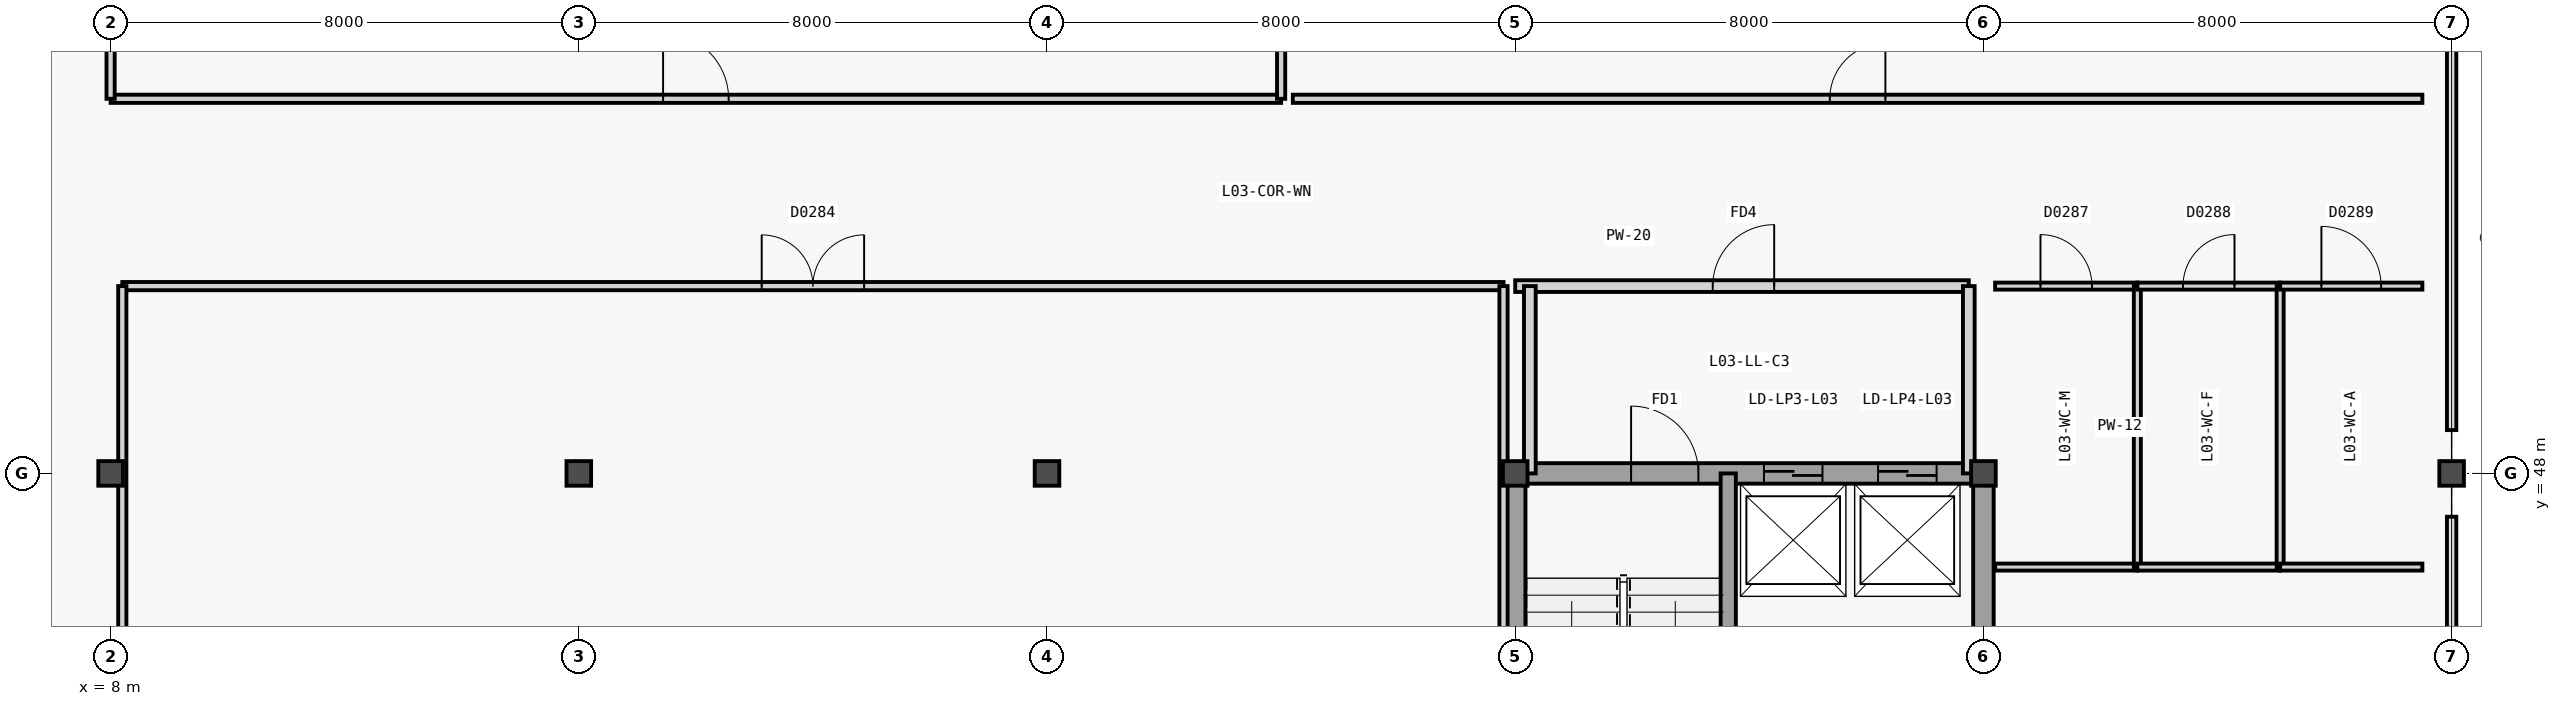
"""IFC4 building model, lengths in metres.
Left out: names, types, materials, properties, quantities, classifications, styles, units other than length and angle.
Written with IfcOpenShell. Run it as: python <this file> out.ifc"""

import sys

from ifc_helpers import new_model, si_unit, direction, frame, frame_2d, origin, origin_2d, place, context, subcontext, project, spatial, rectangle, extrude, element, fill, save


model = new_model("IFC4")
c1 = context("Model", 3, precision=1e-05, world=origin(), true_north=direction((0.0, 1.0)))
c2 = subcontext(c1, "Body", "Model", "MODEL_VIEW")
j1 = project(units=[si_unit("LENGTHUNIT", "METRE"), si_unit("PLANEANGLEUNIT", "RADIAN")], contexts=[c1])
p1 = place(None, origin())
s1 = spatial("IfcSite", under=j1, at=p1, CompositionType="ELEMENT")
p2 = place(p1, origin())
s2 = spatial("IfcBuilding", under=s1, at=p2, CompositionType="ELEMENT")
p3 = place(p2, frame((0.0, 0.0, 14.4)))
s3 = spatial("IfcBuildingStorey", under=s2, at=p3, CompositionType="ELEMENT", Elevation=14.4)
for number, where, z_axis, x_axis in (
    (1, (8.0, 48.0, 0.0), (0.0, 0.0, 1.0), (1.0, 0.0, 0.0)),
    (2, (16.0, 48.0, 0.0), (0.0, 0.0, 1.0), (1.0, 0.0, 0.0)),
    (3, (24.0, 48.0, 0.0), (0.0, 0.0, 1.0), (1.0, 0.0, 0.0)),
    (4, (32.0, 48.0, 0.0), (0.0, 0.0, 1.0), (1.0, 0.0, 0.0)),
    (5, (40.0, 48.0, 0.0), (0.0, 0.0, 1.0), (1.0, 0.0, 0.0)),
    (6, (48.0, 48.0, 0.0), (0.0, 0.0, 1.0), (1.0, 0.0, 0.0)),
):
    element("IfcColumn", number, at=place(p3, frame(where, z_axis=z_axis, x_axis=x_axis)), inside=s3, PredefinedType="COLUMN", context=c2, shape_type="SweptSolid", body=[
        extrude(rectangle(XDim=0.42, YDim=0.42, at=origin_2d()), origin(), (0.0, 0.0, 1.0), 3.6),
    ])
for number, where, z_axis, x_axis in (
    (7, (32.0, 40.0, 0.0), (0.0, 0.0, 1.0), (0.0, 1.0, 0.0)),
    (8, (40.0, 40.0, 0.0), (0.0, 0.0, 1.0), (0.0, 1.0, 0.0)),
):
    element("IfcWall", number, at=place(p3, frame(where, z_axis=z_axis, x_axis=x_axis)), inside=s3, PredefinedType="SHEAR", context=c2, shape_type="SweptSolid", body=[
        extrude(rectangle(XDim=8.0, YDim=0.35, at=frame_2d((4.0, 0.0))), origin(), (0.0, 0.0, 1.0), 3.6),
    ])
p4 = place(p3, frame((32.0, 48.0, 0.0), z_axis=(0.0, 0.0, 1.0), x_axis=(1.0, 0.0, 0.0)))
e9 = element("IfcWall", 9, at=p4, inside=s3, PredefinedType="SHEAR", context=c2, shape_type="SweptSolid", body=[
    extrude(rectangle(XDim=8.0, YDim=0.35, at=frame_2d((4.0, 0.0))), origin(), (0.0, 0.0, 1.0), 3.6),
])
p5 = place(p4, frame((1.98, 0.0, 0.0)))
e10 = element("IfcOpeningElement", 10, at=p5, cuts=e9, PredefinedType="OPENING", context=c2, shape_type="SweptSolid", body=[
    extrude(rectangle(XDim=1.15, YDim=2.2, at=frame_2d((0.575, 1.1))), frame((0.0, 0.185, 0.0), z_axis=(0.0, -1.0, 0.0), x_axis=(1.0, 0.0, 0.0)), (0.0, 0.0, 1.0), 0.37),
])
p6 = place(p4, frame((4.25, 0.0, 0.0)))
e11 = element("IfcOpeningElement", 11, at=p6, cuts=e9, PredefinedType="OPENING", context=c2, shape_type="SweptSolid", body=[
    extrude(rectangle(XDim=1.0, YDim=2.15, at=frame_2d((0.5, 1.075))), frame((0.0, 0.185, 0.0), z_axis=(0.0, -1.0, 0.0), x_axis=(1.0, 0.0, 0.0)), (0.0, 0.0, 1.0), 0.37),
])
p7 = place(p4, frame((6.2, 0.0, 0.0)))
e12 = element("IfcOpeningElement", 12, at=p7, cuts=e9, PredefinedType="OPENING", context=c2, shape_type="SweptSolid", body=[
    extrude(rectangle(XDim=1.0, YDim=2.15, at=frame_2d((0.5, 1.075))), frame((0.0, 0.185, 0.0), z_axis=(0.0, -1.0, 0.0), x_axis=(1.0, 0.0, 0.0)), (0.0, 0.0, 1.0), 0.37),
])
p8 = place(p3, frame((35.64, 40.0, 0.0), z_axis=(0.0, 0.0, 1.0), x_axis=(0.0, 1.0, 0.0)))
e13 = element("IfcWall", 13, at=p8, inside=s3, PredefinedType="SHEAR", context=c2, shape_type="SweptSolid", body=[
    extrude(rectangle(XDim=8.0, YDim=0.26, at=frame_2d((4.0, 0.0))), origin(), (0.0, 0.0, 1.0), 3.6),
])
p9 = place(p3, frame((32.0, 51.2, 0.0), z_axis=(0.0, 0.0, 1.0), x_axis=(1.0, 0.0, 0.0)))
e14 = element("IfcWall", 14, at=p9, inside=s3, PredefinedType="PARTITIONING", context=c2, shape_type="SweptSolid", body=[
    extrude(rectangle(XDim=7.75, YDim=0.2, at=frame_2d((3.875, 0.0))), origin(), (0.0, 0.0, 1.0), 3.32),
])
p10 = place(p9, frame((3.375, 0.0, 0.0)))
e15 = element("IfcOpeningElement", 15, at=p10, cuts=e14, PredefinedType="OPENING", context=c2, shape_type="SweptSolid", body=[
    extrude(rectangle(XDim=1.05, YDim=2.15, at=frame_2d((0.525, 1.075))), frame((0.0, 0.11, 0.0), z_axis=(0.0, -1.0, 0.0), x_axis=(1.0, 0.0, 0.0)), (0.0, 0.0, 1.0), 0.22),
])
for number, where, z_axis, x_axis in (
    (16, (39.75, 48.0, 0.0), (0.0, 0.0, 1.0), (0.0, 1.0, 0.0)),
    (17, (32.25, 48.0, 0.0), (0.0, 0.0, 1.0), (0.0, 1.0, 0.0)),
):
    element("IfcWall", number, at=place(p3, frame(where, z_axis=z_axis, x_axis=x_axis)), inside=s3, PredefinedType="PARTITIONING", context=c2, shape_type="SweptSolid", body=[
        extrude(rectangle(XDim=3.2, YDim=0.2, at=frame_2d((1.6, 0.0))), origin(), (0.0, 0.0, 1.0), 2.78),
    ])
p11 = place(p3, frame((8.2, 51.2, 0.0), z_axis=(0.0, 0.0, 1.0), x_axis=(1.0, 0.0, 0.0)))
e18 = element("IfcWall", 18, at=p11, inside=s3, PredefinedType="PARTITIONING", context=c2, shape_type="SweptSolid", body=[
    extrude(rectangle(XDim=23.6, YDim=0.14, at=frame_2d((11.8, 0.0))), origin(), (0.0, 0.0, 1.0), 3.34),
])
p12 = place(p11, frame((10.925, 0.0, 0.0)))
e19 = element("IfcOpeningElement", 19, at=p12, cuts=e18, PredefinedType="OPENING", context=c2, shape_type="SweptSolid", body=[
    extrude(rectangle(XDim=1.75, YDim=2.2, at=frame_2d((0.875, 1.1))), frame((0.0, 0.08, 0.0), z_axis=(0.0, -1.0, 0.0), x_axis=(1.0, 0.0, 0.0)), (0.0, 0.0, 1.0), 0.16),
])
for number, where, z_axis, x_axis in (
    (20, (8.2, 32.2, 0.0), (0.0, 0.0, 1.0), (0.0, 1.0, 0.0)),
    (21, (31.8, 32.2, 0.0), (0.0, 0.0, 1.0), (0.0, 1.0, 0.0)),
):
    element("IfcWall", number, at=place(p3, frame(where, z_axis=z_axis, x_axis=x_axis)), inside=s3, PredefinedType="PARTITIONING", context=c2, shape_type="SweptSolid", body=[
        extrude(rectangle(XDim=19.0, YDim=0.14, at=frame_2d((9.5, 0.0))), origin(), (0.0, 0.0, 1.0), 2.78),
    ])
p13 = place(p3, frame((8.0, 54.4, 0.0), z_axis=(0.0, 0.0, 1.0), x_axis=(1.0, 0.0, 0.0)))
e22 = element("IfcWall", 22, at=p13, inside=s3, PredefinedType="PARTITIONING", context=c2, shape_type="SweptSolid", body=[
    extrude(rectangle(XDim=20.0, YDim=0.14, at=frame_2d((10.0, 0.0))), origin(), (0.0, 0.0, 1.0), 3.34),
])
p14 = place(p13, frame((9.44, 0.0, 0.0)))
e23 = element("IfcOpeningElement", 23, at=p14, cuts=e22, PredefinedType="OPENING", context=c2, shape_type="SweptSolid", body=[
    extrude(rectangle(XDim=1.12, YDim=2.15, at=frame_2d((0.56, 1.075))), frame((0.0, 0.08, 0.0), z_axis=(0.0, -1.0, 0.0), x_axis=(1.0, 0.0, 0.0)), (0.0, 0.0, 1.0), 0.16),
])
p15 = place(p3, frame((8.0, 54.4, 0.0), z_axis=(0.0, 0.0, 1.0), x_axis=(0.0, 1.0, 0.0)))
e24 = element("IfcWall", 24, at=p15, inside=s3, PredefinedType="PARTITIONING", context=c2, shape_type="SweptSolid", body=[
    extrude(rectangle(XDim=9.1, YDim=0.14, at=frame_2d((4.55, 0.0))), origin(), (0.0, 0.0, 1.0), 2.78),
])
p16 = place(p3, frame((28.0, 54.4, 0.0), z_axis=(0.0, 0.0, 1.0), x_axis=(0.0, 1.0, 0.0)))
e25 = element("IfcWall", 25, at=p16, inside=s3, PredefinedType="PARTITIONING", context=c2, shape_type="SweptSolid", body=[
    extrude(rectangle(XDim=9.1, YDim=0.14, at=frame_2d((4.55, 0.0))), origin(), (0.0, 0.0, 1.0), 2.94),
])
p17 = place(p3, frame((28.2, 54.4, 0.0), z_axis=(0.0, 0.0, 1.0), x_axis=(1.0, 0.0, 0.0)))
e26 = element("IfcWall", 26, at=p17, inside=s3, PredefinedType="PARTITIONING", context=c2, shape_type="SweptSolid", body=[
    extrude(rectangle(XDim=19.3, YDim=0.14, at=frame_2d((9.65, 0.0))), origin(), (0.0, 0.0, 1.0), 3.34),
])
p18 = place(p17, frame((9.175, 0.0, 0.0)))
e27 = element("IfcOpeningElement", 27, at=p18, cuts=e26, PredefinedType="OPENING", context=c2, shape_type="SweptSolid", body=[
    extrude(rectangle(XDim=0.95, YDim=2.1, at=frame_2d((0.475, 1.05))), frame((0.0, 0.08, 0.0), z_axis=(0.0, -1.0, 0.0), x_axis=(1.0, 0.0, 0.0)), (0.0, 0.0, 1.0), 0.16),
])
p19 = place(p3, frame((40.2, 46.4, 0.0), z_axis=(0.0, 0.0, 1.0), x_axis=(1.0, 0.0, 0.0)))
e28 = element("IfcWall", 28, at=p19, inside=s3, PredefinedType="PARTITIONING", context=c2, shape_type="SweptSolid", body=[
    extrude(rectangle(XDim=2.43, YDim=0.12, at=frame_2d((1.215, 0.0))), origin(), (0.0, 0.0, 1.0), 3.34),
])
p20 = place(p3, frame((40.2, 51.2, 0.0), z_axis=(0.0, 0.0, 1.0), x_axis=(1.0, 0.0, 0.0)))
e29 = element("IfcWall", 29, at=p20, inside=s3, PredefinedType="PARTITIONING", context=c2, shape_type="SweptSolid", body=[
    extrude(rectangle(XDim=2.43, YDim=0.12, at=frame_2d((1.215, 0.0))), origin(), (0.0, 0.0, 1.0), 3.34),
])
p21 = place(p20, frame((0.775, 0.0, 0.0)))
e30 = element("IfcOpeningElement", 30, at=p21, cuts=e29, PredefinedType="OPENING", context=c2, shape_type="SweptSolid", body=[
    extrude(rectangle(XDim=0.88, YDim=2.1, at=frame_2d((0.44, 1.05))), frame((0.0, 0.07, 0.0), z_axis=(0.0, -1.0, 0.0), x_axis=(1.0, 0.0, 0.0)), (0.0, 0.0, 1.0), 0.14),
])
p22 = place(p3, frame((42.63, 46.4, 0.0), z_axis=(0.0, 0.0, 1.0), x_axis=(0.0, 1.0, 0.0)))
e31 = element("IfcWall", 31, at=p22, inside=s3, PredefinedType="PARTITIONING", context=c2, shape_type="SweptSolid", body=[
    extrude(rectangle(XDim=4.8, YDim=0.12, at=frame_2d((2.4, 0.0))), origin(), (0.0, 0.0, 1.0), 3.34),
])
p23 = place(p3, frame((42.63, 46.4, 0.0), z_axis=(0.0, 0.0, 1.0), x_axis=(1.0, 0.0, 0.0)))
e32 = element("IfcWall", 32, at=p23, inside=s3, PredefinedType="PARTITIONING", context=c2, shape_type="SweptSolid", body=[
    extrude(rectangle(XDim=2.44, YDim=0.12, at=frame_2d((1.22, 0.0))), origin(), (0.0, 0.0, 1.0), 3.34),
])
p24 = place(p3, frame((42.63, 51.2, 0.0), z_axis=(0.0, 0.0, 1.0), x_axis=(1.0, 0.0, 0.0)))
e33 = element("IfcWall", 33, at=p24, inside=s3, PredefinedType="PARTITIONING", context=c2, shape_type="SweptSolid", body=[
    extrude(rectangle(XDim=2.44, YDim=0.12, at=frame_2d((1.22, 0.0))), origin(), (0.0, 0.0, 1.0), 3.34),
])
p25 = place(p24, frame((0.78, 0.0, 0.0)))
e34 = element("IfcOpeningElement", 34, at=p25, cuts=e33, PredefinedType="OPENING", context=c2, shape_type="SweptSolid", body=[
    extrude(rectangle(XDim=0.88, YDim=2.1, at=frame_2d((0.44, 1.05))), frame((0.0, 0.07, 0.0), z_axis=(0.0, -1.0, 0.0), x_axis=(1.0, 0.0, 0.0)), (0.0, 0.0, 1.0), 0.14),
])
p26 = place(p3, frame((45.07, 46.4, 0.0), z_axis=(0.0, 0.0, 1.0), x_axis=(0.0, 1.0, 0.0)))
e35 = element("IfcWall", 35, at=p26, inside=s3, PredefinedType="PARTITIONING", context=c2, shape_type="SweptSolid", body=[
    extrude(rectangle(XDim=4.8, YDim=0.12, at=frame_2d((2.4, 0.0))), origin(), (0.0, 0.0, 1.0), 3.34),
])
p27 = place(p3, frame((45.07, 46.4, 0.0), z_axis=(0.0, 0.0, 1.0), x_axis=(1.0, 0.0, 0.0)))
e36 = element("IfcWall", 36, at=p27, inside=s3, PredefinedType="PARTITIONING", context=c2, shape_type="SweptSolid", body=[
    extrude(rectangle(XDim=2.43, YDim=0.12, at=frame_2d((1.215, 0.0))), origin(), (0.0, 0.0, 1.0), 3.34),
])
p28 = place(p3, frame((45.07, 51.2, 0.0), z_axis=(0.0, 0.0, 1.0), x_axis=(1.0, 0.0, 0.0)))
e37 = element("IfcWall", 37, at=p28, inside=s3, PredefinedType="PARTITIONING", context=c2, shape_type="SweptSolid", body=[
    extrude(rectangle(XDim=2.43, YDim=0.12, at=frame_2d((1.215, 0.0))), origin(), (0.0, 0.0, 1.0), 3.34),
])
p29 = place(p28, frame((0.705, 0.0, 0.0)))
e38 = element("IfcOpeningElement", 38, at=p29, cuts=e37, PredefinedType="OPENING", context=c2, shape_type="SweptSolid", body=[
    extrude(rectangle(XDim=1.02, YDim=2.1, at=frame_2d((0.51, 1.05))), frame((0.0, 0.07, 0.0), z_axis=(0.0, -1.0, 0.0), x_axis=(1.0, 0.0, 0.0)), (0.0, 0.0, 1.0), 0.14),
])
p30 = place(p5, origin())
e39 = element("IfcDoor", 39, at=p30, inside=s3, OperationType="SINGLE_SWING_LEFT", PredefinedType="DOOR", context=c2, shape_type="SweptSolid", body=[
    extrude(rectangle(XDim=1.15, YDim=2.2, at=frame_2d((0.575, 1.1))), frame((0.0, 0.025, 0.0), z_axis=(0.0, -1.0, 0.0), x_axis=(1.0, 0.0, 0.0)), (0.0, 0.0, 1.0), 0.05),
])
fill(e10, e39)
p31 = place(p6, origin())
e40 = element("IfcDoor", 40, at=p31, inside=s3, OperationType="DOUBLE_DOOR_SLIDING", PredefinedType="DOOR", context=c2, shape_type="SweptSolid", body=[
    extrude(rectangle(XDim=1.0, YDim=2.15, at=frame_2d((0.5, 1.075))), frame((0.0, 0.025, 0.0), z_axis=(0.0, -1.0, 0.0), x_axis=(1.0, 0.0, 0.0)), (0.0, 0.0, 1.0), 0.05),
])
fill(e11, e40)
p32 = place(p7, origin())
e41 = element("IfcDoor", 41, at=p32, inside=s3, OperationType="DOUBLE_DOOR_SLIDING", PredefinedType="DOOR", context=c2, shape_type="SweptSolid", body=[
    extrude(rectangle(XDim=1.0, YDim=2.15, at=frame_2d((0.5, 1.075))), frame((0.0, 0.025, 0.0), z_axis=(0.0, -1.0, 0.0), x_axis=(1.0, 0.0, 0.0)), (0.0, 0.0, 1.0), 0.05),
])
fill(e12, e41)
p33 = place(p10, origin())
e42 = element("IfcDoor", 42, at=p33, inside=s3, OperationType="SINGLE_SWING_RIGHT", PredefinedType="DOOR", context=c2, shape_type="SweptSolid", body=[
    extrude(rectangle(XDim=1.05, YDim=2.15, at=frame_2d((0.525, 1.075))), frame((0.0, 0.025, 0.0), z_axis=(0.0, -1.0, 0.0), x_axis=(1.0, 0.0, 0.0)), (0.0, 0.0, 1.0), 0.05),
])
fill(e15, e42)
p34 = place(p12, origin())
e43 = element("IfcDoor", 43, at=p34, inside=s3, OperationType="DOUBLE_DOOR_SINGLE_SWING", PredefinedType="DOOR", context=c2, shape_type="SweptSolid", body=[
    extrude(rectangle(XDim=1.75, YDim=2.2, at=frame_2d((0.875, 1.1))), frame((0.0, 0.025, 0.0), z_axis=(0.0, -1.0, 0.0), x_axis=(1.0, 0.0, 0.0)), (0.0, 0.0, 1.0), 0.05),
])
fill(e19, e43)
p35 = place(p14, origin())
e44 = element("IfcDoor", 44, at=p35, inside=s3, OperationType="SINGLE_SWING_LEFT", PredefinedType="DOOR", context=c2, shape_type="SweptSolid", body=[
    extrude(rectangle(XDim=1.12, YDim=2.15, at=frame_2d((0.56, 1.075))), frame((0.0, 0.025, 0.0), z_axis=(0.0, -1.0, 0.0), x_axis=(1.0, 0.0, 0.0)), (0.0, 0.0, 1.0), 0.05),
])
fill(e23, e44)
p36 = place(p18, origin())
e45 = element("IfcDoor", 45, at=p36, inside=s3, OperationType="SINGLE_SWING_RIGHT", PredefinedType="DOOR", context=c2, shape_type="SweptSolid", body=[
    extrude(rectangle(XDim=0.95, YDim=2.1, at=frame_2d((0.475, 1.05))), frame((0.0, 0.025, 0.0), z_axis=(0.0, -1.0, 0.0), x_axis=(1.0, 0.0, 0.0)), (0.0, 0.0, 1.0), 0.05),
])
fill(e27, e45)
p37 = place(p21, origin())
e46 = element("IfcDoor", 46, at=p37, inside=s3, OperationType="SINGLE_SWING_LEFT", PredefinedType="DOOR", context=c2, shape_type="SweptSolid", body=[
    extrude(rectangle(XDim=0.88, YDim=2.1, at=frame_2d((0.44, 1.05))), frame((0.0, 0.025, 0.0), z_axis=(0.0, -1.0, 0.0), x_axis=(1.0, 0.0, 0.0)), (0.0, 0.0, 1.0), 0.05),
])
fill(e30, e46)
p38 = place(p25, origin())
e47 = element("IfcDoor", 47, at=p38, inside=s3, OperationType="SINGLE_SWING_RIGHT", PredefinedType="DOOR", context=c2, shape_type="SweptSolid", body=[
    extrude(rectangle(XDim=0.88, YDim=2.1, at=frame_2d((0.44, 1.05))), frame((0.0, 0.025, 0.0), z_axis=(0.0, -1.0, 0.0), x_axis=(1.0, 0.0, 0.0)), (0.0, 0.0, 1.0), 0.05),
])
fill(e34, e47)
p39 = place(p29, origin())
e48 = element("IfcDoor", 48, at=p39, inside=s3, OperationType="SINGLE_SWING_LEFT", PredefinedType="DOOR", context=c2, shape_type="SweptSolid", body=[
    extrude(rectangle(XDim=1.02, YDim=2.1, at=frame_2d((0.51, 1.05))), frame((0.0, 0.025, 0.0), z_axis=(0.0, -1.0, 0.0), x_axis=(1.0, 0.0, 0.0)), (0.0, 0.0, 1.0), 0.05),
])
fill(e38, e48)
save(model, sys.argv[1])
